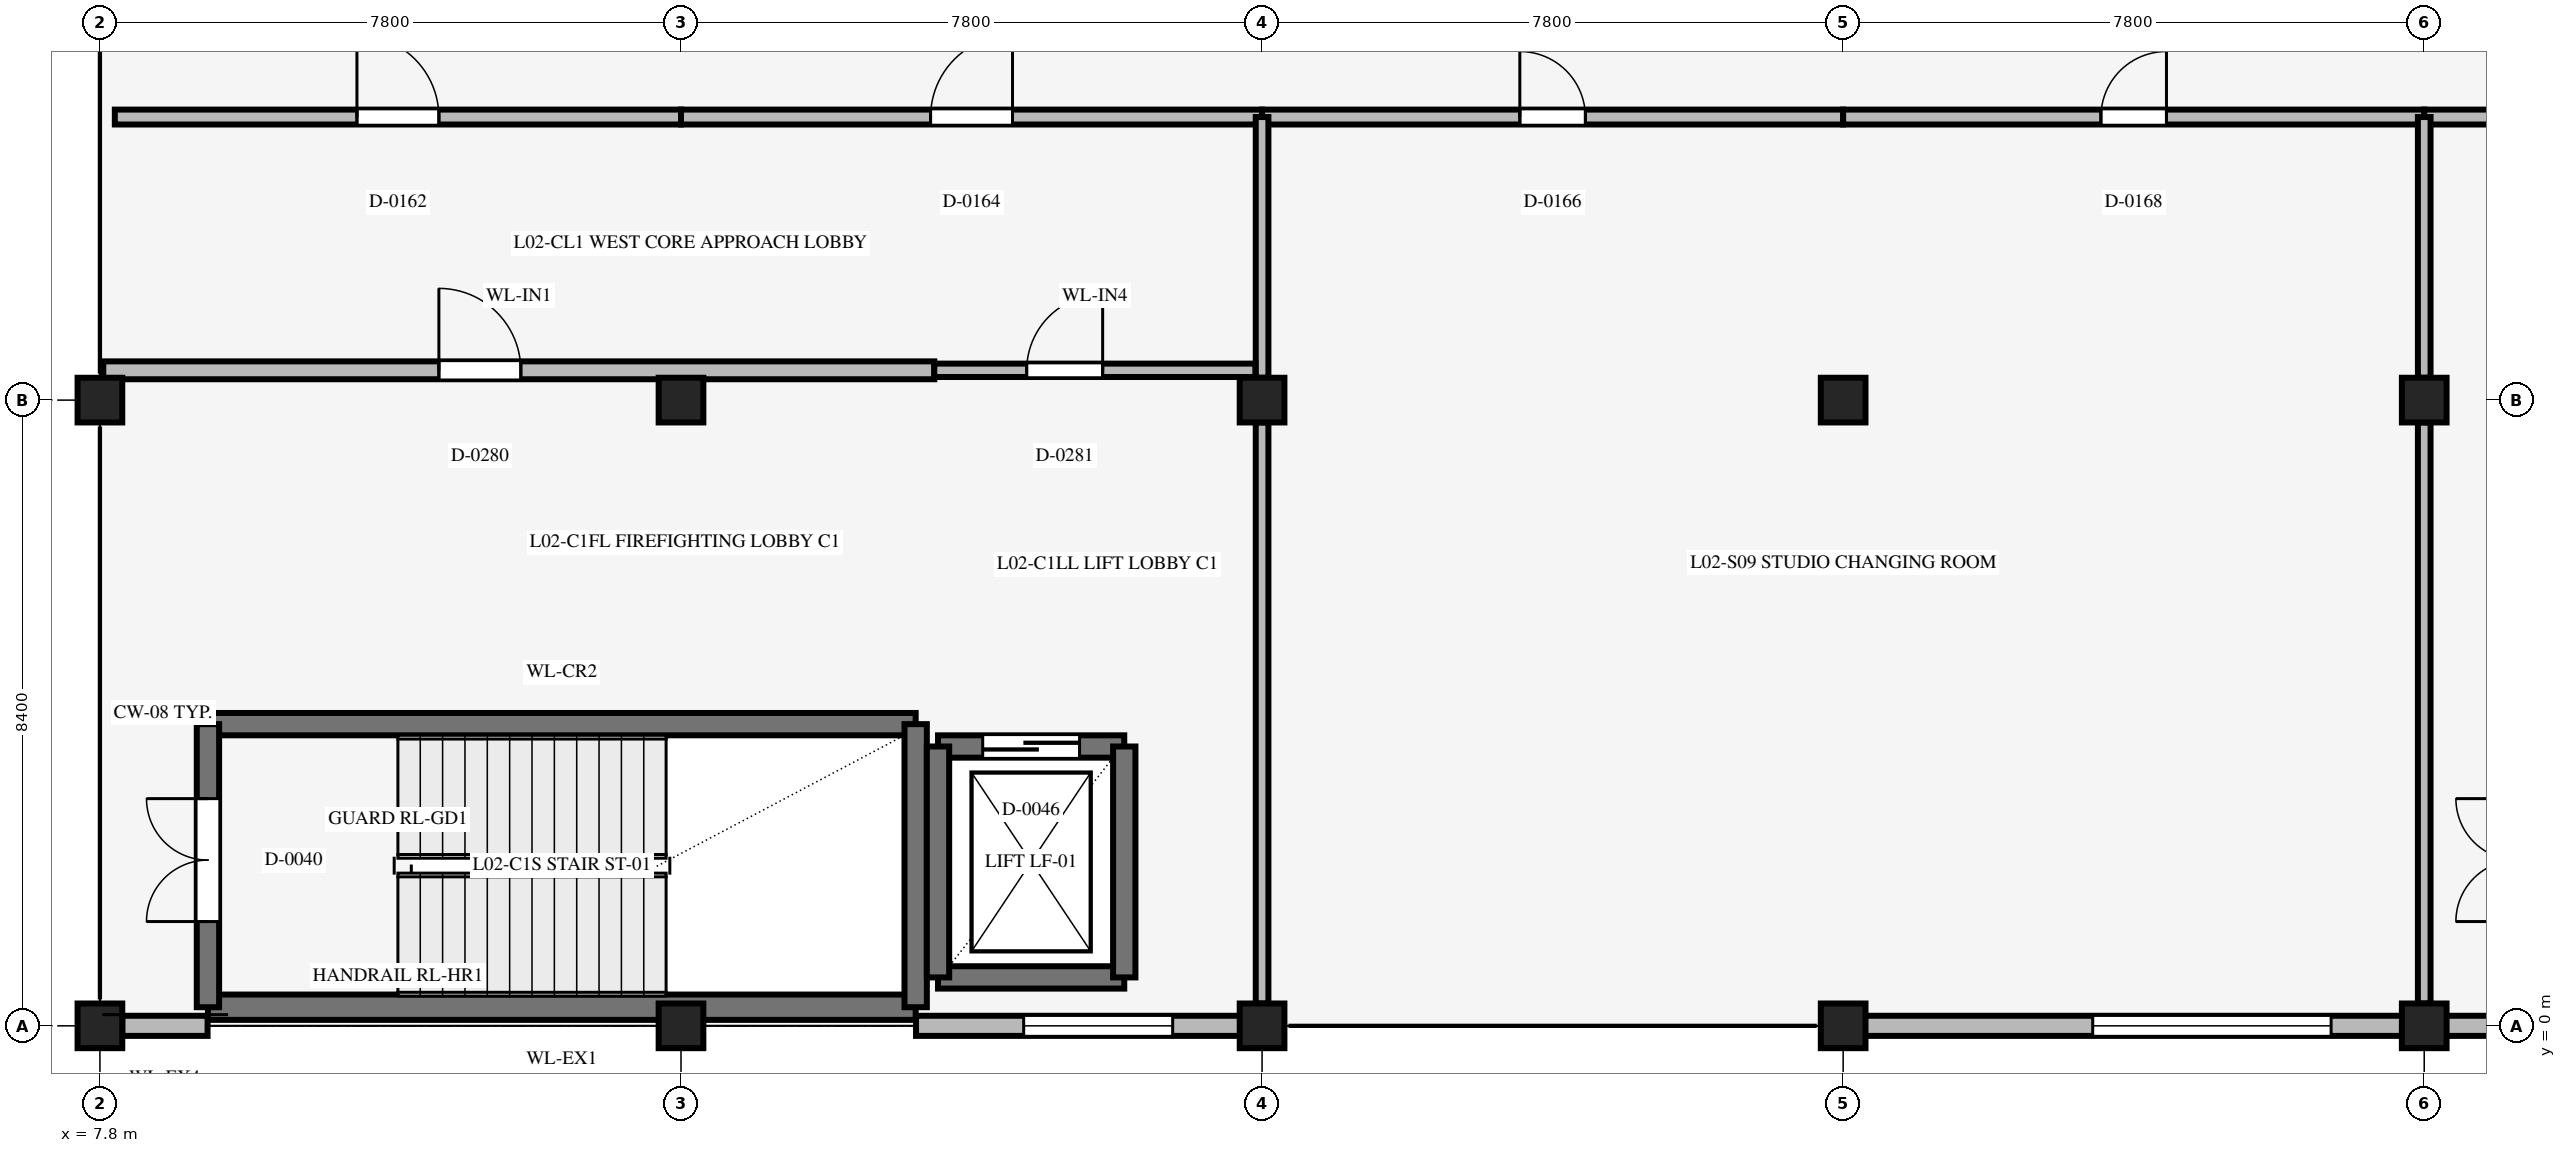
"""IFC4 building model, lengths in metres.
Left out: names, types, materials, properties, quantities, classifications, styles, units other than length and angle.
Written with IfcOpenShell. Run it as: python <this file> out.ifc"""

import sys

from ifc_helpers import new_model, si_unit, direction, frame, frame_2d, origin, origin_2d, place, context, subcontext, project, spatial, rectangle, extrude, element, fill, save


model = new_model("IFC4")
c1 = context("Model", 3, precision=1e-05, world=origin(), true_north=direction((0.0, 1.0)))
c2 = subcontext(c1, "Body", "Model", "MODEL_VIEW")
j1 = project(units=[si_unit("LENGTHUNIT", "METRE"), si_unit("PLANEANGLEUNIT", "RADIAN")], contexts=[c1])
p1 = place(None, origin())
s1 = spatial("IfcSite", under=j1, at=p1, CompositionType="ELEMENT")
p2 = place(p1, origin())
s2 = spatial("IfcBuilding", under=s1, at=p2, CompositionType="ELEMENT")
p3 = place(p2, frame((0.0, 0.0, 12.0)))
s3 = spatial("IfcBuildingStorey", under=s2, at=p3, CompositionType="ELEMENT", Elevation=12.0)
for number, where, z_axis, x_axis in (
    (1, (7.8, 0.0, 0.0), (0.0, 0.0, 1.0), (1.0, 0.0, 0.0)),
    (2, (7.8, 8.4, 0.0), (0.0, 0.0, 1.0), (1.0, 0.0, 0.0)),
    (3, (15.6, 0.0, 0.0), (0.0, 0.0, 1.0), (1.0, 0.0, 0.0)),
    (4, (15.6, 8.4, 0.0), (0.0, 0.0, 1.0), (1.0, 0.0, 0.0)),
    (5, (23.4, 0.0, 0.0), (0.0, 0.0, 1.0), (1.0, 0.0, 0.0)),
    (6, (23.4, 8.4, 0.0), (0.0, 0.0, 1.0), (1.0, 0.0, 0.0)),
    (7, (31.2, 0.0, 0.0), (0.0, 0.0, 1.0), (1.0, 0.0, 0.0)),
    (8, (31.2, 8.4, 0.0), (0.0, 0.0, 1.0), (1.0, 0.0, 0.0)),
    (9, (39.0, 0.0, 0.0), (0.0, 0.0, 1.0), (1.0, 0.0, 0.0)),
    (10, (39.0, 8.4, 0.0), (0.0, 0.0, 1.0), (1.0, 0.0, 0.0)),
):
    element("IfcColumn", number, at=place(p3, frame(where, z_axis=z_axis, x_axis=x_axis)), inside=s3, PredefinedType="COLUMN", context=c2, shape_type="SweptSolid", body=[
        extrude(rectangle(XDim=0.6, YDim=0.6, at=origin_2d()), origin(), (0.0, 0.0, 1.0), 3.9),
    ])
p4 = place(p3, frame((18.75, 0.25, 0.0), z_axis=(0.0, 0.0, 1.0), x_axis=(-1.0, 0.0, 0.0)))
e11 = element("IfcWall", 11, at=p4, inside=s3, PredefinedType="STANDARD", context=c2, shape_type="SweptSolid", body=[
    extrude(rectangle(XDim=9.5, YDim=0.34, at=frame_2d((4.75, 0.0))), origin(), (0.0, 0.0, 1.0), 3.9),
])
p5 = place(p3, frame((9.25, 4.05, 0.0), z_axis=(0.0, 0.0, 1.0), x_axis=(1.0, 0.0, 0.0)))
e12 = element("IfcWall", 12, at=p5, inside=s3, PredefinedType="SHEAR", context=c2, shape_type="SweptSolid", body=[
    extrude(rectangle(XDim=9.5, YDim=0.3, at=frame_2d((4.75, 0.0))), origin(), (0.0, 0.0, 1.0), 3.9),
])
p6 = place(p3, frame((9.25, 0.25, 0.0), z_axis=(0.0, 0.0, 1.0), x_axis=(0.0, 1.0, 0.0)))
e13 = element("IfcWall", 13, at=p6, inside=s3, PredefinedType="SHEAR", context=c2, shape_type="SweptSolid", body=[
    extrude(rectangle(XDim=3.8, YDim=0.3, at=frame_2d((1.9, 0.0))), origin(), (0.0, 0.0, 1.0), 3.9),
])
p7 = place(p6, frame((1.15, 0.0, 0.0)))
e14 = element("IfcOpeningElement", 14, at=p7, cuts=e13, PredefinedType="OPENING", context=c2, shape_type="SweptSolid", body=[
    extrude(rectangle(XDim=1.65, YDim=2.2, at=frame_2d((0.825, 1.1))), frame((0.0, 0.16, 0.0), z_axis=(0.0, -1.0, 0.0), x_axis=(1.0, 0.0, 0.0)), (0.0, 0.0, 1.0), 0.32),
])
p8 = place(p3, frame((18.75, 0.25, 0.0), z_axis=(0.0, 0.0, 1.0), x_axis=(0.0, 1.0, 0.0)))
e15 = element("IfcWall", 15, at=p8, inside=s3, PredefinedType="SHEAR", context=c2, shape_type="SweptSolid", body=[
    extrude(rectangle(XDim=3.8, YDim=0.3, at=frame_2d((1.9, 0.0))), origin(), (0.0, 0.0, 1.0), 3.9),
])
p9 = place(p3, frame((19.05, 0.65, 0.0), z_axis=(0.0, 0.0, 1.0), x_axis=(1.0, 0.0, 0.0)))
e16 = element("IfcWall", 16, at=p9, inside=s3, PredefinedType="SHEAR", context=c2, shape_type="SweptSolid", body=[
    extrude(rectangle(XDim=2.5, YDim=0.3, at=frame_2d((1.25, 0.0))), origin(), (0.0, 0.0, 1.0), 3.64),
])
p10 = place(p3, frame((19.05, 3.75, 0.0), z_axis=(0.0, 0.0, 1.0), x_axis=(1.0, 0.0, 0.0)))
e17 = element("IfcWall", 17, at=p10, inside=s3, PredefinedType="SHEAR", context=c2, shape_type="SweptSolid", body=[
    extrude(rectangle(XDim=2.5, YDim=0.3, at=frame_2d((1.25, 0.0))), origin(), (0.0, 0.0, 1.0), 3.64),
])
p11 = place(p10, frame((0.6, 0.0, 0.0)))
e18 = element("IfcOpeningElement", 18, at=p11, cuts=e17, PredefinedType="OPENING", context=c2, shape_type="SweptSolid", body=[
    extrude(rectangle(XDim=1.3, YDim=2.2, at=frame_2d((0.65, 1.1))), frame((0.0, 0.16, 0.0), z_axis=(0.0, -1.0, 0.0), x_axis=(1.0, 0.0, 0.0)), (0.0, 0.0, 1.0), 0.32),
])
for number, where, z_axis, x_axis in (
    (19, (19.05, 0.65, 0.0), (0.0, 0.0, 1.0), (0.0, 1.0, 0.0)),
    (20, (21.55, 0.65, 0.0), (0.0, 0.0, 1.0), (0.0, 1.0, 0.0)),
):
    element("IfcWall", number, at=place(p3, frame(where, z_axis=z_axis, x_axis=x_axis)), inside=s3, PredefinedType="SHEAR", context=c2, shape_type="SweptSolid", body=[
        extrude(rectangle(XDim=3.1, YDim=0.3, at=frame_2d((1.55, 0.0))), origin(), (0.0, 0.0, 1.0), 3.64),
    ])
p12 = place(p3, frame((9.245, 0.0, 0.0), z_axis=(0.0, 0.0, 1.0), x_axis=(-1.0, 0.0, 0.0)))
e21 = element("IfcWall", 21, at=p12, inside=s3, PredefinedType="STANDARD", context=c2, shape_type="SweptSolid", body=[
    extrude(rectangle(XDim=1.145, YDim=0.27, at=frame_2d((0.573, 0.0))), origin(), (0.0, 0.0, 1.0), 3.64),
])
p13 = place(p3, frame((23.11, 0.0, 0.0), z_axis=(0.0, 0.0, 1.0), x_axis=(-1.0, 0.0, 0.0)))
e22 = element("IfcWall", 22, at=p13, inside=s3, PredefinedType="STANDARD", context=c2, shape_type="SweptSolid", body=[
    extrude(rectangle(XDim=4.355, YDim=0.27, at=frame_2d((2.178, 0.0))), origin(), (0.0, 0.0, 1.0), 3.64),
])
p14 = place(p13, frame((0.91, 0.0, 1.2)))
e23 = element("IfcOpeningElement", 23, at=p14, cuts=e22, PredefinedType="OPENING", context=c2, shape_type="SweptSolid", body=[
    extrude(rectangle(XDim=2.0, YDim=0.9, at=frame_2d((1.0, 0.45))), frame((0.0, 0.145, 0.0), z_axis=(0.0, -1.0, 0.0), x_axis=(1.0, 0.0, 0.0)), (0.0, 0.0, 1.0), 0.29),
])
p15 = place(p3, frame((38.71, 0.0, 0.0), z_axis=(0.0, 0.0, 1.0), x_axis=(-1.0, 0.0, 0.0)))
e24 = element("IfcWall", 24, at=p15, inside=s3, PredefinedType="STANDARD", context=c2, shape_type="SweptSolid", body=[
    extrude(rectangle(XDim=7.22, YDim=0.27, at=frame_2d((3.61, 0.0))), origin(), (0.0, 0.0, 1.0), 3.271),
])
p16 = place(p15, frame((0.96, 0.0, 0.9)))
e25 = element("IfcOpeningElement", 25, at=p16, cuts=e24, PredefinedType="OPENING", context=c2, shape_type="SweptSolid", body=[
    extrude(rectangle(XDim=3.2, YDim=2.1, at=frame_2d((1.6, 1.05))), frame((0.0, 0.145, 0.0), z_axis=(0.0, -1.0, 0.0), x_axis=(1.0, 0.0, 0.0)), (0.0, 0.0, 1.0), 0.29),
])
p17 = place(p3, frame((40.245, 0.0, 0.0), z_axis=(0.0, 0.0, 1.0), x_axis=(-1.0, 0.0, 0.0)))
e26 = element("IfcWall", 26, at=p17, inside=s3, PredefinedType="STANDARD", context=c2, shape_type="SweptSolid", body=[
    extrude(rectangle(XDim=0.955, YDim=0.27, at=frame_2d((0.478, 0.0))), origin(), (0.0, 0.0, 1.0), 3.64),
])
p18 = place(p3, frame((8.0, 12.2, 0.0), z_axis=(0.0, 0.0, 1.0), x_axis=(1.0, 0.0, 0.0)))
e27 = element("IfcWall", 27, at=p18, inside=s3, PredefinedType="STANDARD", context=c2, shape_type="SweptSolid", body=[
    extrude(rectangle(XDim=7.6, YDim=0.2, at=frame_2d((3.8, 0.0))), origin(), (0.0, 0.0, 1.0), 3.05),
])
p19 = place(p18, frame((3.25, 0.0, 0.0)))
e28 = element("IfcOpeningElement", 28, at=p19, cuts=e27, PredefinedType="OPENING", context=c2, shape_type="SweptSolid", body=[
    extrude(rectangle(XDim=1.1, YDim=2.2, at=frame_2d((0.55, 1.1))), frame((0.0, 0.11, 0.0), z_axis=(0.0, -1.0, 0.0), x_axis=(1.0, 0.0, 0.0)), (0.0, 0.0, 1.0), 0.22),
])
p20 = place(p3, frame((15.6, 12.2, 0.0), z_axis=(0.0, 0.0, 1.0), x_axis=(1.0, 0.0, 0.0)))
e29 = element("IfcWall", 29, at=p20, inside=s3, PredefinedType="STANDARD", context=c2, shape_type="SweptSolid", body=[
    extrude(rectangle(XDim=7.8, YDim=0.2, at=frame_2d((3.9, 0.0))), origin(), (0.0, 0.0, 1.0), 3.05),
])
p21 = place(p20, frame((3.35, 0.0, 0.0)))
e30 = element("IfcOpeningElement", 30, at=p21, cuts=e29, PredefinedType="OPENING", context=c2, shape_type="SweptSolid", body=[
    extrude(rectangle(XDim=1.1, YDim=2.2, at=frame_2d((0.55, 1.1))), frame((0.0, 0.11, 0.0), z_axis=(0.0, -1.0, 0.0), x_axis=(1.0, 0.0, 0.0)), (0.0, 0.0, 1.0), 0.22),
])
p22 = place(p3, frame((23.4, 12.2, 0.0), z_axis=(0.0, 0.0, 1.0), x_axis=(1.0, 0.0, 0.0)))
e31 = element("IfcWall", 31, at=p22, inside=s3, PredefinedType="STANDARD", context=c2, shape_type="SweptSolid", body=[
    extrude(rectangle(XDim=7.8, YDim=0.2, at=frame_2d((3.9, 0.0))), origin(), (0.0, 0.0, 1.0), 3.05),
])
p23 = place(p22, frame((3.46, 0.0, 0.0)))
e32 = element("IfcOpeningElement", 32, at=p23, cuts=e31, PredefinedType="OPENING", context=c2, shape_type="SweptSolid", body=[
    extrude(rectangle(XDim=0.88, YDim=2.1, at=frame_2d((0.44, 1.05))), frame((0.0, 0.11, 0.0), z_axis=(0.0, -1.0, 0.0), x_axis=(1.0, 0.0, 0.0)), (0.0, 0.0, 1.0), 0.22),
])
p24 = place(p3, frame((31.2, 12.2, 0.0), z_axis=(0.0, 0.0, 1.0), x_axis=(1.0, 0.0, 0.0)))
e33 = element("IfcWall", 33, at=p24, inside=s3, PredefinedType="STANDARD", context=c2, shape_type="SweptSolid", body=[
    extrude(rectangle(XDim=7.8, YDim=0.2, at=frame_2d((3.9, 0.0))), origin(), (0.0, 0.0, 1.0), 3.05),
])
p25 = place(p24, frame((3.46, 0.0, 0.0)))
e34 = element("IfcOpeningElement", 34, at=p25, cuts=e33, PredefinedType="OPENING", context=c2, shape_type="SweptSolid", body=[
    extrude(rectangle(XDim=0.88, YDim=2.1, at=frame_2d((0.44, 1.05))), frame((0.0, 0.11, 0.0), z_axis=(0.0, -1.0, 0.0), x_axis=(1.0, 0.0, 0.0)), (0.0, 0.0, 1.0), 0.22),
])
p26 = place(p3, frame((39.0, 12.2, 0.0), z_axis=(0.0, 0.0, 1.0), x_axis=(1.0, 0.0, 0.0)))
e35 = element("IfcWall", 35, at=p26, inside=s3, PredefinedType="STANDARD", context=c2, shape_type="SweptSolid", body=[
    extrude(rectangle(XDim=7.8, YDim=0.2, at=frame_2d((3.9, 0.0))), origin(), (0.0, 0.0, 1.0), 3.05),
])
p27 = place(p26, frame((3.46, 0.0, 0.0)))
e36 = element("IfcOpeningElement", 36, at=p27, cuts=e35, PredefinedType="OPENING", context=c2, shape_type="SweptSolid", body=[
    extrude(rectangle(XDim=0.88, YDim=2.1, at=frame_2d((0.44, 1.05))), frame((0.0, 0.11, 0.0), z_axis=(0.0, -1.0, 0.0), x_axis=(1.0, 0.0, 0.0)), (0.0, 0.0, 1.0), 0.22),
])
p28 = place(p3, frame((23.4, 0.3, 0.0), z_axis=(0.0, 0.0, 1.0), x_axis=(0.0, 1.0, 0.0)))
e37 = element("IfcWall", 37, at=p28, inside=s3, PredefinedType="STANDARD", context=c2, shape_type="SweptSolid", body=[
    extrude(rectangle(XDim=7.8, YDim=0.17, at=frame_2d((3.9, 0.0))), origin(), (0.0, 0.0, 1.0), 2.971),
])
p29 = place(p3, frame((23.4, 8.7, 0.0), z_axis=(0.0, 0.0, 1.0), x_axis=(0.0, 1.0, 0.0)))
e38 = element("IfcWall", 38, at=p29, inside=s3, PredefinedType="STANDARD", context=c2, shape_type="SweptSolid", body=[
    extrude(rectangle(XDim=3.5, YDim=0.17, at=frame_2d((1.75, 0.0))), origin(), (0.0, 0.0, 1.0), 2.971),
])
p30 = place(p3, frame((39.0, 0.3, 0.0), z_axis=(0.0, 0.0, 1.0), x_axis=(0.0, 1.0, 0.0)))
e39 = element("IfcWall", 39, at=p30, inside=s3, PredefinedType="STANDARD", context=c2, shape_type="SweptSolid", body=[
    extrude(rectangle(XDim=7.8, YDim=0.17, at=frame_2d((3.9, 0.0))), origin(), (0.0, 0.0, 1.0), 2.971),
])
p31 = place(p3, frame((39.0, 8.7, 0.0), z_axis=(0.0, 0.0, 1.0), x_axis=(0.0, 1.0, 0.0)))
e40 = element("IfcWall", 40, at=p31, inside=s3, PredefinedType="STANDARD", context=c2, shape_type="SweptSolid", body=[
    extrude(rectangle(XDim=3.5, YDim=0.17, at=frame_2d((1.75, 0.0))), origin(), (0.0, 0.0, 1.0), 2.971),
])
p32 = place(p3, frame((7.845, 8.8, 0.0), z_axis=(0.0, 0.0, 1.0), x_axis=(1.0, 0.0, 0.0)))
e41 = element("IfcWall", 41, at=p32, inside=s3, PredefinedType="STANDARD", context=c2, shape_type="SweptSolid", body=[
    extrude(rectangle(XDim=11.155, YDim=0.24, at=frame_2d((5.578, 0.0))), origin(), (0.0, 0.0, 1.0), 3.05),
])
p33 = place(p32, frame((4.505, 0.0, 0.0)))
e42 = element("IfcOpeningElement", 42, at=p33, cuts=e41, PredefinedType="OPENING", context=c2, shape_type="SweptSolid", body=[
    extrude(rectangle(XDim=1.1, YDim=2.2, at=frame_2d((0.55, 1.1))), frame((0.0, 0.13, 0.0), z_axis=(0.0, -1.0, 0.0), x_axis=(1.0, 0.0, 0.0)), (0.0, 0.0, 1.0), 0.26),
])
p34 = place(p3, frame((19.0, 8.8, 0.0), z_axis=(0.0, 0.0, 1.0), x_axis=(1.0, 0.0, 0.0)))
e43 = element("IfcWall", 43, at=p34, inside=s3, PredefinedType="STANDARD", context=c2, shape_type="SweptSolid", body=[
    extrude(rectangle(XDim=4.31, YDim=0.18, at=frame_2d((2.155, 0.0))), origin(), (0.0, 0.0, 1.0), 3.05),
])
p35 = place(p34, frame((1.24, 0.0, 0.0)))
e44 = element("IfcOpeningElement", 44, at=p35, cuts=e43, PredefinedType="OPENING", context=c2, shape_type="SweptSolid", body=[
    extrude(rectangle(XDim=1.02, YDim=2.15, at=frame_2d((0.51, 1.075))), frame((0.0, 0.1, 0.0), z_axis=(0.0, -1.0, 0.0), x_axis=(1.0, 0.0, 0.0)), (0.0, 0.0, 1.0), 0.2),
])
p36 = place(p14, origin())
e45 = element("IfcWindow", 45, at=p36, inside=s3, PartitioningType="SINGLE_PANEL", PredefinedType="WINDOW", context=c2, shape_type="SweptSolid", body=[
    extrude(rectangle(XDim=2.0, YDim=0.9, at=frame_2d((1.0, 0.45))), frame((0.0, 0.03, 0.0), z_axis=(0.0, -1.0, 0.0), x_axis=(1.0, 0.0, 0.0)), (0.0, 0.0, 1.0), 0.06),
])
fill(e23, e45)
p37 = place(p16, origin())
e46 = element("IfcWindow", 46, at=p37, inside=s3, PartitioningType="SINGLE_PANEL", PredefinedType="WINDOW", context=c2, shape_type="SweptSolid", body=[
    extrude(rectangle(XDim=3.2, YDim=2.1, at=frame_2d((1.6, 1.05))), frame((0.0, 0.03, 0.0), z_axis=(0.0, -1.0, 0.0), x_axis=(1.0, 0.0, 0.0)), (0.0, 0.0, 1.0), 0.06),
])
fill(e25, e46)
p38 = place(p7, origin())
e47 = element("IfcDoor", 47, at=p38, inside=s3, OperationType="DOUBLE_DOOR_SINGLE_SWING", PredefinedType="DOOR", context=c2, shape_type="SweptSolid", body=[
    extrude(rectangle(XDim=1.65, YDim=2.2, at=frame_2d((0.825, 1.1))), frame((0.0, 0.025, 0.0), z_axis=(0.0, -1.0, 0.0), x_axis=(1.0, 0.0, 0.0)), (0.0, 0.0, 1.0), 0.05),
])
fill(e14, e47)
p39 = place(p11, origin())
e48 = element("IfcDoor", 48, at=p39, inside=s3, OperationType="DOUBLE_DOOR_SLIDING", PredefinedType="DOOR", context=c2, shape_type="SweptSolid", body=[
    extrude(rectangle(XDim=1.3, YDim=2.2, at=frame_2d((0.65, 1.1))), frame((0.0, 0.025, 0.0), z_axis=(0.0, -1.0, 0.0), x_axis=(1.0, 0.0, 0.0)), (0.0, 0.0, 1.0), 0.05),
])
fill(e18, e48)
p40 = place(p19, origin())
e49 = element("IfcDoor", 49, at=p40, inside=s3, OperationType="SINGLE_SWING_LEFT", PredefinedType="DOOR", context=c2, shape_type="SweptSolid", body=[
    extrude(rectangle(XDim=1.1, YDim=2.2, at=frame_2d((0.55, 1.1))), frame((0.0, 0.025, 0.0), z_axis=(0.0, -1.0, 0.0), x_axis=(1.0, 0.0, 0.0)), (0.0, 0.0, 1.0), 0.05),
])
fill(e28, e49)
p41 = place(p21, origin())
e50 = element("IfcDoor", 50, at=p41, inside=s3, OperationType="SINGLE_SWING_RIGHT", PredefinedType="DOOR", context=c2, shape_type="SweptSolid", body=[
    extrude(rectangle(XDim=1.1, YDim=2.2, at=frame_2d((0.55, 1.1))), frame((0.0, 0.025, 0.0), z_axis=(0.0, -1.0, 0.0), x_axis=(1.0, 0.0, 0.0)), (0.0, 0.0, 1.0), 0.05),
])
fill(e30, e50)
p42 = place(p23, origin())
e51 = element("IfcDoor", 51, at=p42, inside=s3, OperationType="SINGLE_SWING_LEFT", PredefinedType="DOOR", context=c2, shape_type="SweptSolid", body=[
    extrude(rectangle(XDim=0.88, YDim=2.1, at=frame_2d((0.44, 1.05))), frame((0.0, 0.025, 0.0), z_axis=(0.0, -1.0, 0.0), x_axis=(1.0, 0.0, 0.0)), (0.0, 0.0, 1.0), 0.05),
])
fill(e32, e51)
p43 = place(p25, origin())
e52 = element("IfcDoor", 52, at=p43, inside=s3, OperationType="SINGLE_SWING_RIGHT", PredefinedType="DOOR", context=c2, shape_type="SweptSolid", body=[
    extrude(rectangle(XDim=0.88, YDim=2.1, at=frame_2d((0.44, 1.05))), frame((0.0, 0.025, 0.0), z_axis=(0.0, -1.0, 0.0), x_axis=(1.0, 0.0, 0.0)), (0.0, 0.0, 1.0), 0.05),
])
fill(e34, e52)
p44 = place(p33, origin())
e53 = element("IfcDoor", 53, at=p44, inside=s3, OperationType="SINGLE_SWING_LEFT", PredefinedType="DOOR", context=c2, shape_type="SweptSolid", body=[
    extrude(rectangle(XDim=1.1, YDim=2.2, at=frame_2d((0.55, 1.1))), frame((0.0, 0.025, 0.0), z_axis=(0.0, -1.0, 0.0), x_axis=(1.0, 0.0, 0.0)), (0.0, 0.0, 1.0), 0.05),
])
fill(e42, e53)
p45 = place(p35, origin())
e54 = element("IfcDoor", 54, at=p45, inside=s3, OperationType="SINGLE_SWING_RIGHT", PredefinedType="DOOR", context=c2, shape_type="SweptSolid", body=[
    extrude(rectangle(XDim=1.02, YDim=2.15, at=frame_2d((0.51, 1.075))), frame((0.0, 0.025, 0.0), z_axis=(0.0, -1.0, 0.0), x_axis=(1.0, 0.0, 0.0)), (0.0, 0.0, 1.0), 0.05),
])
fill(e44, e54)
save(model, sys.argv[1])
